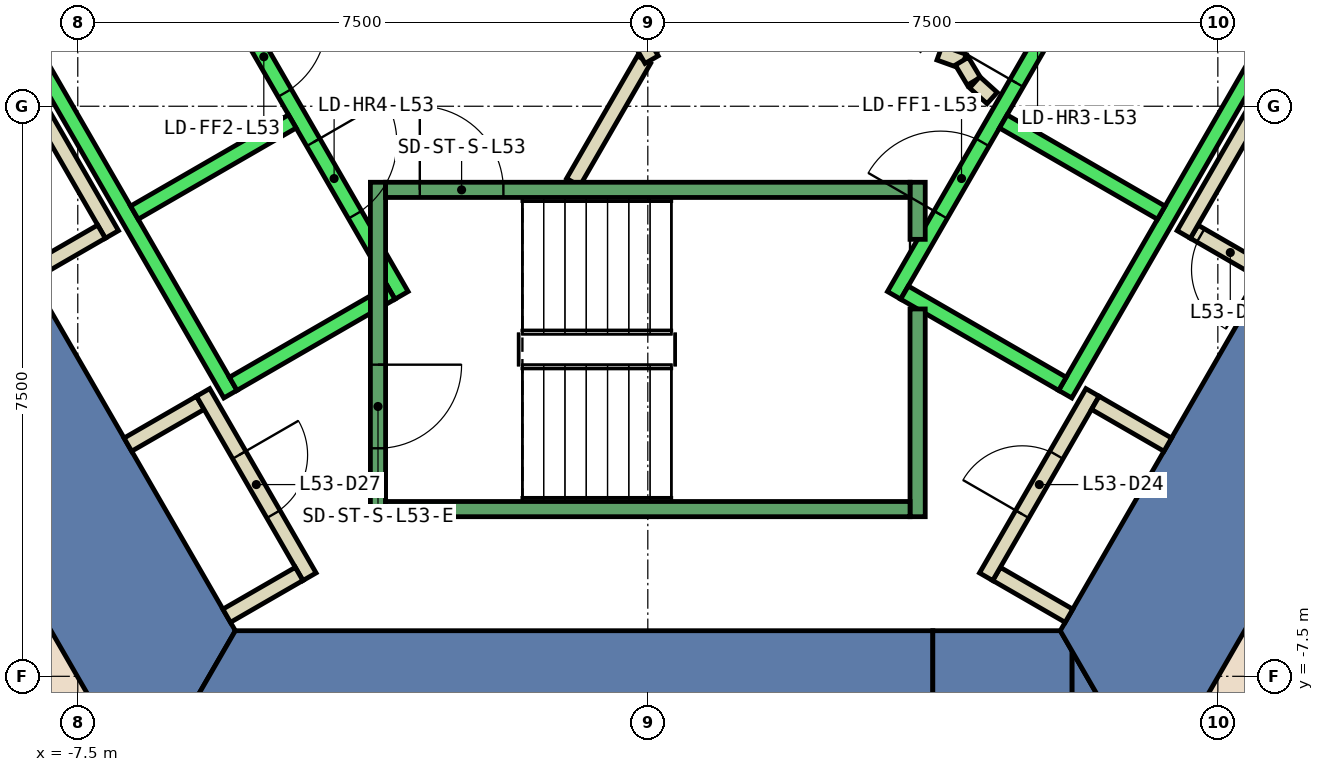
"""IFC4 building model, lengths in metres.
Left out: names, types, materials, properties, quantities, classifications, styles, units other than length and angle.
Written with IfcOpenShell. Run it as: python <this file> out.ifc"""

import sys

from ifc_helpers import new_model, si_unit, direction, frame, frame_2d, origin, place, context, subcontext, project, spatial, polyline, rectangle, outline, extrude, element, fill, save


model = new_model("IFC4")
c1 = context("Model", 3, precision=1e-05, world=origin(), true_north=direction((0.0, 1.0)))
c2 = subcontext(c1, "Body", "Model", "MODEL_VIEW")
j1 = project(units=[si_unit("LENGTHUNIT", "METRE"), si_unit("PLANEANGLEUNIT", "RADIAN")], contexts=[c1])
p1 = place(None, origin())
s1 = spatial("IfcSite", under=j1, at=p1, CompositionType="ELEMENT")
p2 = place(p1, origin())
s2 = spatial("IfcBuilding", under=s1, at=p2, CompositionType="ELEMENT")
p3 = place(p2, frame((0.0, 0.0, 236.0)))
s3 = spatial("IfcBuildingStorey", under=s2, at=p3, CompositionType="ELEMENT", Elevation=236.0)
p4 = place(p3, frame((0.0, 0.0, -0.6)))
e1 = element("IfcWall", 1, at=p4, inside=s3, PredefinedType="SHEAR", context=c2, shape_type="SweptSolid", body=[
    extrude(outline(polyline([(-13.279, 2.5), (-6.64, -9.0), (-5.427, -6.9), (-10.854, 2.5), (-13.279, 2.5)])), origin(), (0.0, 0.0, 1.0), 5.4),
])
p5 = place(p3, frame((0.0, 0.0, -0.6)))
e2 = element("IfcWall", 2, at=p5, inside=s3, PredefinedType="SHEAR", context=c2, shape_type="SweptSolid", body=[
    extrude(outline(polyline([(3.75, -9.0), (3.75, -6.9), (-5.427, -6.9), (-6.64, -9.0), (3.75, -9.0)])), origin(), (0.0, 0.0, 1.0), 5.4),
])
p6 = place(p3, frame((0.0, 0.0, -0.6)))
e3 = element("IfcWall", 3, at=p6, inside=s3, PredefinedType="SHEAR", context=c2, shape_type="SweptSolid", body=[
    extrude(outline(polyline([(5.58, -7.165), (5.58, -9.0), (6.64, -9.0), (5.58, -7.165)])), origin(), (0.0, 0.0, 1.0), 5.4),
])
p7 = place(p3, frame((0.0, 0.0, 3.6)))
e4 = element("IfcWall", 4, at=p7, inside=s3, PredefinedType="SHEAR", context=c2, shape_type="SweptSolid", body=[
    extrude(outline(polyline([(5.58, -9.0), (5.58, -7.165), (5.427, -6.9), (3.75, -6.9), (3.75, -9.0), (5.58, -9.0)])), origin(), (0.0, 0.0, 1.0), 1.2),
])
p8 = place(p3, frame((0.0, 0.0, -0.6)))
e5 = element("IfcWall", 5, at=p8, inside=s3, PredefinedType="SHEAR", context=c2, shape_type="SweptSolid", body=[
    extrude(outline(polyline([(6.64, -9.0), (13.279, 2.5), (10.854, 2.5), (5.427, -6.9), (6.64, -9.0)])), origin(), (0.0, 0.0, 1.0), 5.4),
])
p9 = place(p3, frame((5.541, -6.703, 0.0), z_axis=(0.0, 0.0, 1.0), x_axis=(-0.86621513555, 0.499671230855, 0.0)))
e6 = element("IfcWall", 6, at=p9, inside=s3, PredefinedType="PARTITIONING", context=c2, shape_type="SweptSolid", body=[
    extrude(rectangle(XDim=1.1, YDim=0.2, at=frame_2d((0.55, 0.0))), origin(), (0.0, 0.0, 1.0), 4.8),
])
p10 = place(p3, frame((4.451, -6.19, 0.0), z_axis=(0.0, 0.0, 1.0), x_axis=(0.500011755427, 0.866018616679, 0.0)))
e7 = element("IfcWall", 7, at=p10, inside=s3, PredefinedType="PARTITIONING", context=c2, shape_type="SweptSolid", body=[
    extrude(rectangle(XDim=2.8, YDim=0.2, at=frame_2d((1.4, 0.0))), origin(), (0.0, 0.0, 1.0), 4.8),
])
p11 = place(p10, frame((0.95, 0.0, 0.0)))
e8 = element("IfcOpeningElement", 8, at=p11, cuts=e7, PredefinedType="OPENING", context=c2, shape_type="SweptSolid", body=[
    extrude(rectangle(XDim=0.9, YDim=2.1, at=frame_2d((0.45, 1.05))), frame((0.0, 0.11, 0.0), z_axis=(0.0, -1.0, 0.0), x_axis=(1.0, 0.0, 0.0)), (0.0, 0.0, 1.0), 0.22),
])
p12 = place(p3, frame((5.888, -3.902, 0.0), z_axis=(0.0, 0.0, 1.0), x_axis=(0.86621513555, -0.499671230855, 0.0)))
e9 = element("IfcWall", 9, at=p12, inside=s3, PredefinedType="PARTITIONING", context=c2, shape_type="SweptSolid", body=[
    extrude(rectangle(XDim=1.1, YDim=0.2, at=frame_2d((0.55, 0.0))), origin(), (0.0, 0.0, 1.0), 4.8),
])
p13 = place(p3, frame((8.14, -2.2, 0.0), z_axis=(0.0, 0.0, 1.0), x_axis=(-0.865841558281, 0.500318294642, 0.0)))
e10 = element("IfcWall", 10, at=p13, inside=s3, PredefinedType="PARTITIONING", context=c2, shape_type="SweptSolid", body=[
    extrude(rectangle(XDim=1.099, YDim=0.2, at=frame_2d((0.55, 0.0))), origin(), (0.0, 0.0, 1.0), 4.8),
])
p14 = place(p13, frame((0.1, 0.0, 0.0)))
e11 = element("IfcOpeningElement", 11, at=p14, cuts=e10, PredefinedType="OPENING", context=c2, shape_type="SweptSolid", body=[
    extrude(rectangle(XDim=0.9, YDim=2.1, at=frame_2d((0.45, 1.05))), frame((0.0, 0.11, 0.0), z_axis=(0.0, -1.0, 0.0), x_axis=(1.0, 0.0, 0.0)), (0.0, 0.0, 1.0), 0.22),
])
p15 = place(p3, frame((7.051, -1.687, 0.0), z_axis=(0.0, 0.0, 1.0), x_axis=(0.49994636267, 0.866056369097, 0.0)))
e12 = element("IfcWall", 12, at=p15, inside=s3, PredefinedType="PARTITIONING", context=c2, shape_type="SweptSolid", body=[
    extrude(rectangle(XDim=2.8, YDim=0.2, at=frame_2d((1.4, 0.0))), origin(), (0.0, 0.0, 1.0), 4.8),
])
p16 = place(p3, frame((-9.751, 2.99, 0.0), z_axis=(0.0, 0.0, 1.0), x_axis=(0.499955951776, -0.866050833545, 0.0)))
e13 = element("IfcWall", 13, at=p16, inside=s3, PredefinedType="PARTITIONING", context=c2, shape_type="SweptSolid", body=[
    extrude(rectangle(XDim=5.4, YDim=0.2, at=frame_2d((2.7, 0.0))), origin(), (0.0, 0.0, 1.0), 4.8),
])
p17 = place(p3, frame((-7.188, -1.65, 0.0), z_axis=(0.0, 0.0, 1.0), x_axis=(-0.865841558281, -0.500318294642, 0.0)))
e14 = element("IfcWall", 14, at=p17, inside=s3, PredefinedType="PARTITIONING", context=c2, shape_type="SweptSolid", body=[
    extrude(rectangle(XDim=1.099, YDim=0.2, at=frame_2d((0.55, 0.0))), origin(), (0.0, 0.0, 1.0), 4.8),
])
p18 = place(p3, frame((-6.841, -4.452, 0.0), z_axis=(0.0, 0.0, 1.0), x_axis=(0.86621513555, 0.499671230855, 0.0)))
e15 = element("IfcWall", 15, at=p18, inside=s3, PredefinedType="PARTITIONING", context=c2, shape_type="SweptSolid", body=[
    extrude(rectangle(XDim=1.1, YDim=0.2, at=frame_2d((0.55, 0.0))), origin(), (0.0, 0.0, 1.0), 4.8),
])
p19 = place(p3, frame((-5.851, -3.765, 0.0), z_axis=(0.0, 0.0, 1.0), x_axis=(0.500011755427, -0.866018616679, 0.0)))
e16 = element("IfcWall", 16, at=p19, inside=s3, PredefinedType="PARTITIONING", context=c2, shape_type="SweptSolid", body=[
    extrude(rectangle(XDim=2.8, YDim=0.2, at=frame_2d((1.4, 0.0))), origin(), (0.0, 0.0, 1.0), 4.8),
])
p20 = place(p19, frame((0.95, 0.0, 0.0)))
e17 = element("IfcOpeningElement", 17, at=p20, cuts=e16, PredefinedType="OPENING", context=c2, shape_type="SweptSolid", body=[
    extrude(rectangle(XDim=0.9, YDim=2.1, at=frame_2d((0.45, 1.05))), frame((0.0, 0.11, 0.0), z_axis=(0.0, -1.0, 0.0), x_axis=(1.0, 0.0, 0.0)), (0.0, 0.0, 1.0), 0.22),
])
p21 = place(p3, frame((-4.588, -6.153, 0.0), z_axis=(0.0, 0.0, 1.0), x_axis=(-0.86621513555, -0.499671230855, 0.0)))
e18 = element("IfcWall", 18, at=p21, inside=s3, PredefinedType="PARTITIONING", context=c2, shape_type="SweptSolid", body=[
    extrude(rectangle(XDim=1.1, YDim=0.2, at=frame_2d((0.55, 0.0))), origin(), (0.0, 0.0, 1.0), 4.8),
])
p22 = place(p3, frame((-0.982, -1.0, 0.0), z_axis=(0.0, 0.0, 1.0), x_axis=(0.50024047865, 0.865886518847, 0.0)))
e19 = element("IfcWall", 19, at=p22, inside=s3, PredefinedType="PARTITIONING", context=c2, shape_type="SweptSolid", body=[
    extrude(rectangle(XDim=1.863, YDim=0.2, at=frame_2d((0.931, 0.0))), origin(), (0.0, 0.0, 1.0), 4.8),
])
p23 = place(p3, frame((3.838, 0.702, 0.0), z_axis=(0.0, 0.0, 1.0), x_axis=(0.941035081519, -0.338308993895, 0.0)))
e20 = element("IfcWall", 20, at=p23, inside=s3, PredefinedType="PARTITIONING", context=c2, shape_type="SweptSolid", body=[
    extrude(rectangle(XDim=0.337, YDim=0.2, at=frame_2d((0.168, 0.0))), origin(), (0.0, 0.0, 1.0), 4.8),
])
p24 = place(p3, frame((4.132, 0.593, 0.0), z_axis=(0.0, 0.0, 1.0), x_axis=(0.513561617048, -0.858052717201, 0.0)))
e21 = element("IfcWall", 21, at=p24, inside=s3, PredefinedType="PARTITIONING", context=c2, shape_type="SweptSolid", body=[
    extrude(rectangle(XDim=0.308, YDim=0.2, at=frame_2d((0.154, 0.0))), origin(), (0.0, 0.0, 1.0), 4.8),
])
p25 = place(p3, frame((4.301, 0.315, 0.0), z_axis=(0.0, 0.0, 1.0), x_axis=(0.741798017506, -0.670623367639, 0.0)))
e22 = element("IfcWall", 22, at=p25, inside=s3, PredefinedType="PARTITIONING", context=c2, shape_type="SweptSolid", body=[
    extrude(rectangle(XDim=0.309, YDim=0.2, at=frame_2d((0.154, 0.0))), origin(), (0.0, 0.0, 1.0), 4.8),
])
p26 = place(p3, frame((-2.54, 5.1, 0.0), z_axis=(0.0, 0.0, 1.0), x_axis=(0.499925051871, -0.866068670783, 0.0)))
e23 = element("IfcWall", 23, at=p26, inside=s3, PredefinedType="PARTITIONING", context=c2, shape_type="SweptSolid", body=[
    extrude(rectangle(XDim=5.181, YDim=0.2, at=frame_2d((2.59, 0.0))), origin(), (0.0, 0.0, 1.0), 4.8),
])
p27 = place(p26, frame((2.04, 0.0, 0.0)))
e24 = element("IfcOpeningElement", 24, at=p27, cuts=e23, PredefinedType="OPENING", context=c2, shape_type="SweptSolid", body=[
    extrude(rectangle(XDim=1.0, YDim=2.1, at=frame_2d((0.5, 1.05))), frame((0.0, 0.11, 0.0), z_axis=(0.0, -1.0, 0.0), x_axis=(1.0, 0.0, 0.0)), (0.0, 0.0, 1.0), 0.22),
])
p28 = place(p3, frame((-5.94, 2.188, 0.0), z_axis=(0.0, 0.0, 1.0), x_axis=(0.500034260056, -0.866005622828, 0.0)))
e25 = element("IfcWall", 25, at=p28, inside=s3, PredefinedType="STANDARD", context=c2, shape_type="SweptSolid", body=[
    extrude(rectangle(XDim=5.399, YDim=0.2, at=frame_2d((2.7, 0.0))), origin(), (0.0, 0.0, 1.0), 4.8),
])
p29 = place(p28, frame((3.075, 0.0, 0.0)))
e26 = element("IfcOpeningElement", 26, at=p29, cuts=e25, PredefinedType="OPENING", context=c2, shape_type="SweptSolid", body=[
    extrude(rectangle(XDim=1.1, YDim=2.1, at=frame_2d((0.55, 1.05))), frame((0.0, 0.11, 0.0), z_axis=(0.0, -1.0, 0.0), x_axis=(1.0, 0.0, 0.0)), (0.0, 0.0, 1.0), 0.22),
])
p30 = place(p28, frame((1.225, 0.0, 0.0)))
e27 = element("IfcOpeningElement", 27, at=p30, cuts=e25, PredefinedType="OPENING", context=c2, shape_type="SweptSolid", body=[
    extrude(rectangle(XDim=1.1, YDim=2.1, at=frame_2d((0.55, 1.05))), frame((0.0, 0.11, 0.0), z_axis=(0.0, -1.0, 0.0), x_axis=(1.0, 0.0, 0.0)), (0.0, 0.0, 1.0), 0.22),
])
p31 = place(p3, frame((-8.192, 0.888, 0.0), z_axis=(0.0, 0.0, 1.0), x_axis=(0.500034260056, -0.866005622828, 0.0)))
e28 = element("IfcWall", 28, at=p31, inside=s3, PredefinedType="STANDARD", context=c2, shape_type="SweptSolid", body=[
    extrude(rectangle(XDim=5.399, YDim=0.2, at=frame_2d((2.7, 0.0))), origin(), (0.0, 0.0, 1.0), 4.8),
])
p32 = place(p3, frame((-4.677, -0.2, 0.0), z_axis=(0.0, 0.0, 1.0), x_axis=(-0.865973769406, -0.500089422704, 0.0)))
e29 = element("IfcWall", 29, at=p32, inside=s3, PredefinedType="STANDARD", context=c2, shape_type="SweptSolid", body=[
    extrude(rectangle(XDim=2.399, YDim=0.2, at=frame_2d((1.2, 0.0))), origin(), (0.0, 0.0, 1.0), 4.8),
])
p33 = place(p3, frame((-3.377, -2.452, 0.0), z_axis=(0.0, 0.0, 1.0), x_axis=(-0.865955154139, -0.50012165622, 0.0)))
e30 = element("IfcWall", 30, at=p33, inside=s3, PredefinedType="STANDARD", context=c2, shape_type="SweptSolid", body=[
    extrude(rectangle(XDim=2.4, YDim=0.2, at=frame_2d((1.2, 0.0))), origin(), (0.0, 0.0, 1.0), 4.8),
])
p34 = place(p3, frame((3.24, -2.488, 0.0), z_axis=(0.0, 0.0, 1.0), x_axis=(0.500034260056, 0.866005622828, 0.0)))
e31 = element("IfcWall", 31, at=p34, inside=s3, PredefinedType="STANDARD", context=c2, shape_type="SweptSolid", body=[
    extrude(rectangle(XDim=5.399, YDim=0.2, at=frame_2d((2.7, 0.0))), origin(), (0.0, 0.0, 1.0), 4.8),
])
p35 = place(p34, frame((3.225, 0.0, 0.0)))
e32 = element("IfcOpeningElement", 32, at=p35, cuts=e31, PredefinedType="OPENING", context=c2, shape_type="SweptSolid", body=[
    extrude(rectangle(XDim=1.1, YDim=2.1, at=frame_2d((0.55, 1.05))), frame((0.0, 0.11, 0.0), z_axis=(0.0, -1.0, 0.0), x_axis=(1.0, 0.0, 0.0)), (0.0, 0.0, 1.0), 0.22),
])
p36 = place(p34, frame((1.225, 0.0, 0.0)))
e33 = element("IfcOpeningElement", 33, at=p36, cuts=e31, PredefinedType="OPENING", context=c2, shape_type="SweptSolid", body=[
    extrude(rectangle(XDim=1.1, YDim=2.1, at=frame_2d((0.55, 1.05))), frame((0.0, 0.11, 0.0), z_axis=(0.0, -1.0, 0.0), x_axis=(1.0, 0.0, 0.0)), (0.0, 0.0, 1.0), 0.22),
])
p37 = place(p3, frame((5.492, -3.788, 0.0), z_axis=(0.0, 0.0, 1.0), x_axis=(0.500034260056, 0.866005622828, 0.0)))
e34 = element("IfcWall", 34, at=p37, inside=s3, PredefinedType="STANDARD", context=c2, shape_type="SweptSolid", body=[
    extrude(rectangle(XDim=5.399, YDim=0.2, at=frame_2d((2.7, 0.0))), origin(), (0.0, 0.0, 1.0), 4.8),
])
p38 = place(p3, frame((3.377, -2.452, 0.0), z_axis=(0.0, 0.0, 1.0), x_axis=(0.865955154139, -0.50012165622, 0.0)))
e35 = element("IfcWall", 35, at=p38, inside=s3, PredefinedType="STANDARD", context=c2, shape_type="SweptSolid", body=[
    extrude(rectangle(XDim=2.4, YDim=0.2, at=frame_2d((1.2, 0.0))), origin(), (0.0, 0.0, 1.0), 4.8),
])
p39 = place(p3, frame((4.677, -0.2, 0.0), z_axis=(0.0, 0.0, 1.0), x_axis=(0.865973769406, -0.500089422704, 0.0)))
e36 = element("IfcWall", 36, at=p39, inside=s3, PredefinedType="STANDARD", context=c2, shape_type="SweptSolid", body=[
    extrude(rectangle(XDim=2.399, YDim=0.2, at=frame_2d((1.2, 0.0))), origin(), (0.0, 0.0, 1.0), 4.8),
])
p40 = place(p3, frame((-3.55, -1.0, 0.0), z_axis=(0.0, 0.0, 1.0), x_axis=(0.0, -1.0, 0.0)))
e37 = element("IfcWall", 37, at=p40, inside=s3, PredefinedType="STANDARD", context=c2, shape_type="SweptSolid", body=[
    extrude(rectangle(XDim=4.4, YDim=0.2, at=frame_2d((2.2, 0.0))), origin(), (0.0, 0.0, 1.0), 4.8),
])
p41 = place(p40, frame((2.4, 0.0, 0.0)))
e38 = element("IfcOpeningElement", 38, at=p41, cuts=e37, PredefinedType="OPENING", context=c2, shape_type="SweptSolid", body=[
    extrude(rectangle(XDim=1.1, YDim=2.2, at=frame_2d((0.55, 1.1))), frame((0.0, 0.11, 0.0), z_axis=(0.0, -1.0, 0.0), x_axis=(1.0, 0.0, 0.0)), (0.0, 0.0, 1.0), 0.22),
])
p42 = place(p3, frame((3.55, -2.667, 0.0), z_axis=(0.0, 0.0, 1.0), x_axis=(0.0, -1.0, 0.0)))
e39 = element("IfcWall", 39, at=p42, inside=s3, PredefinedType="STANDARD", context=c2, shape_type="SweptSolid", body=[
    extrude(rectangle(XDim=2.733, YDim=0.2, at=frame_2d((1.366, 0.0))), origin(), (0.0, 0.0, 1.0), 4.8),
])
p43 = place(p3, frame((3.55, -1.0, 0.0), z_axis=(0.0, 0.0, 1.0), x_axis=(0.0, -1.0, 0.0)))
e40 = element("IfcWall", 40, at=p43, inside=s3, PredefinedType="STANDARD", context=c2, shape_type="SweptSolid", body=[
    extrude(rectangle(XDim=0.751, YDim=0.2, at=frame_2d((0.375, 0.0))), origin(), (0.0, 0.0, 1.0), 4.8),
])
p44 = place(p3, frame((-3.45, -1.1, 0.0), z_axis=(0.0, 0.0, 1.0), x_axis=(1.0, 0.0, 0.0)))
e41 = element("IfcWall", 41, at=p44, inside=s3, PredefinedType="STANDARD", context=c2, shape_type="SweptSolid", body=[
    extrude(rectangle(XDim=6.9, YDim=0.2, at=frame_2d((3.45, 0.0))), origin(), (0.0, 0.0, 1.0), 4.8),
])
p45 = place(p44, frame((0.45, 0.0, 0.0)))
e42 = element("IfcOpeningElement", 42, at=p45, cuts=e41, PredefinedType="OPENING", context=c2, shape_type="SweptSolid", body=[
    extrude(rectangle(XDim=1.1, YDim=2.2, at=frame_2d((0.55, 1.1))), frame((0.0, 0.11, 0.0), z_axis=(0.0, -1.0, 0.0), x_axis=(1.0, 0.0, 0.0)), (0.0, 0.0, 1.0), 0.22),
])
p46 = place(p3, frame((-3.45, -5.3, 0.0), z_axis=(0.0, 0.0, 1.0), x_axis=(1.0, 0.0, 0.0)))
e43 = element("IfcWall", 43, at=p46, inside=s3, PredefinedType="STANDARD", context=c2, shape_type="SweptSolid", body=[
    extrude(rectangle(XDim=6.9, YDim=0.2, at=frame_2d((3.45, 0.0))), origin(), (0.0, 0.0, 1.0), 4.8),
])
p47 = place(p11, origin())
e44 = element("IfcDoor", 44, at=p47, inside=s3, OperationType="SINGLE_SWING_LEFT", PredefinedType="DOOR", context=c2, shape_type="SweptSolid", body=[
    extrude(rectangle(XDim=0.9, YDim=2.1, at=frame_2d((0.45, 1.05))), frame((0.0, 0.025, 0.0), z_axis=(0.0, -1.0, 0.0), x_axis=(1.0, 0.0, 0.0)), (0.0, 0.0, 1.0), 0.05),
])
fill(e8, e44)
p48 = place(p14, origin())
e45 = element("IfcDoor", 45, at=p48, inside=s3, OperationType="SINGLE_SWING_RIGHT", PredefinedType="DOOR", context=c2, shape_type="SweptSolid", body=[
    extrude(rectangle(XDim=0.9, YDim=2.1, at=frame_2d((0.45, 1.05))), frame((0.0, 0.025, 0.0), z_axis=(0.0, -1.0, 0.0), x_axis=(1.0, 0.0, 0.0)), (0.0, 0.0, 1.0), 0.05),
])
fill(e11, e45)
p49 = place(p20, origin())
e46 = element("IfcDoor", 46, at=p49, inside=s3, OperationType="SINGLE_SWING_RIGHT", PredefinedType="DOOR", context=c2, shape_type="SweptSolid", body=[
    extrude(rectangle(XDim=0.9, YDim=2.1, at=frame_2d((0.45, 1.05))), frame((0.0, 0.025, 0.0), z_axis=(0.0, -1.0, 0.0), x_axis=(1.0, 0.0, 0.0)), (0.0, 0.0, 1.0), 0.05),
])
fill(e17, e46)
p50 = place(p35, origin())
e47 = element("IfcDoor", 47, at=p50, inside=s3, OperationType="SLIDING_TO_LEFT", PredefinedType="DOOR", context=c2, shape_type="SweptSolid", body=[
    extrude(rectangle(XDim=1.1, YDim=2.1, at=frame_2d((0.55, 1.05))), frame((0.0, 0.025, 0.0), z_axis=(0.0, -1.0, 0.0), x_axis=(1.0, 0.0, 0.0)), (0.0, 0.0, 1.0), 0.05),
])
fill(e32, e47)
p51 = place(p29, origin())
e48 = element("IfcDoor", 48, at=p51, inside=s3, OperationType="SLIDING_TO_LEFT", PredefinedType="DOOR", context=c2, shape_type="SweptSolid", body=[
    extrude(rectangle(XDim=1.1, YDim=2.1, at=frame_2d((0.55, 1.05))), frame((0.0, 0.025, 0.0), z_axis=(0.0, -1.0, 0.0), x_axis=(1.0, 0.0, 0.0)), (0.0, 0.0, 1.0), 0.05),
])
fill(e26, e48)
p52 = place(p36, origin())
e49 = element("IfcDoor", 49, at=p52, inside=s3, OperationType="SLIDING_TO_LEFT", PredefinedType="DOOR", context=c2, shape_type="SweptSolid", body=[
    extrude(rectangle(XDim=1.1, YDim=2.1, at=frame_2d((0.55, 1.05))), frame((0.0, 0.025, 0.0), z_axis=(0.0, -1.0, 0.0), x_axis=(1.0, 0.0, 0.0)), (0.0, 0.0, 1.0), 0.05),
])
fill(e33, e49)
p53 = place(p30, origin())
e50 = element("IfcDoor", 50, at=p53, inside=s3, OperationType="SLIDING_TO_LEFT", PredefinedType="DOOR", context=c2, shape_type="SweptSolid", body=[
    extrude(rectangle(XDim=1.1, YDim=2.1, at=frame_2d((0.55, 1.05))), frame((0.0, 0.025, 0.0), z_axis=(0.0, -1.0, 0.0), x_axis=(1.0, 0.0, 0.0)), (0.0, 0.0, 1.0), 0.05),
])
fill(e27, e50)
p54 = place(p45, origin())
e51 = element("IfcDoor", 51, at=p54, inside=s3, OperationType="SINGLE_SWING_LEFT", PredefinedType="DOOR", context=c2, shape_type="SweptSolid", body=[
    extrude(rectangle(XDim=1.1, YDim=2.2, at=frame_2d((0.55, 1.1))), frame((0.0, 0.025, 0.0), z_axis=(0.0, -1.0, 0.0), x_axis=(1.0, 0.0, 0.0)), (0.0, 0.0, 1.0), 0.05),
])
fill(e42, e51)
p55 = place(p41, origin())
e52 = element("IfcDoor", 52, at=p55, inside=s3, OperationType="SINGLE_SWING_LEFT", PredefinedType="DOOR", context=c2, shape_type="SweptSolid", body=[
    extrude(rectangle(XDim=1.1, YDim=2.2, at=frame_2d((0.55, 1.1))), frame((0.0, 0.025, 0.0), z_axis=(0.0, -1.0, 0.0), x_axis=(1.0, 0.0, 0.0)), (0.0, 0.0, 1.0), 0.05),
])
fill(e38, e52)
save(model, sys.argv[1])
